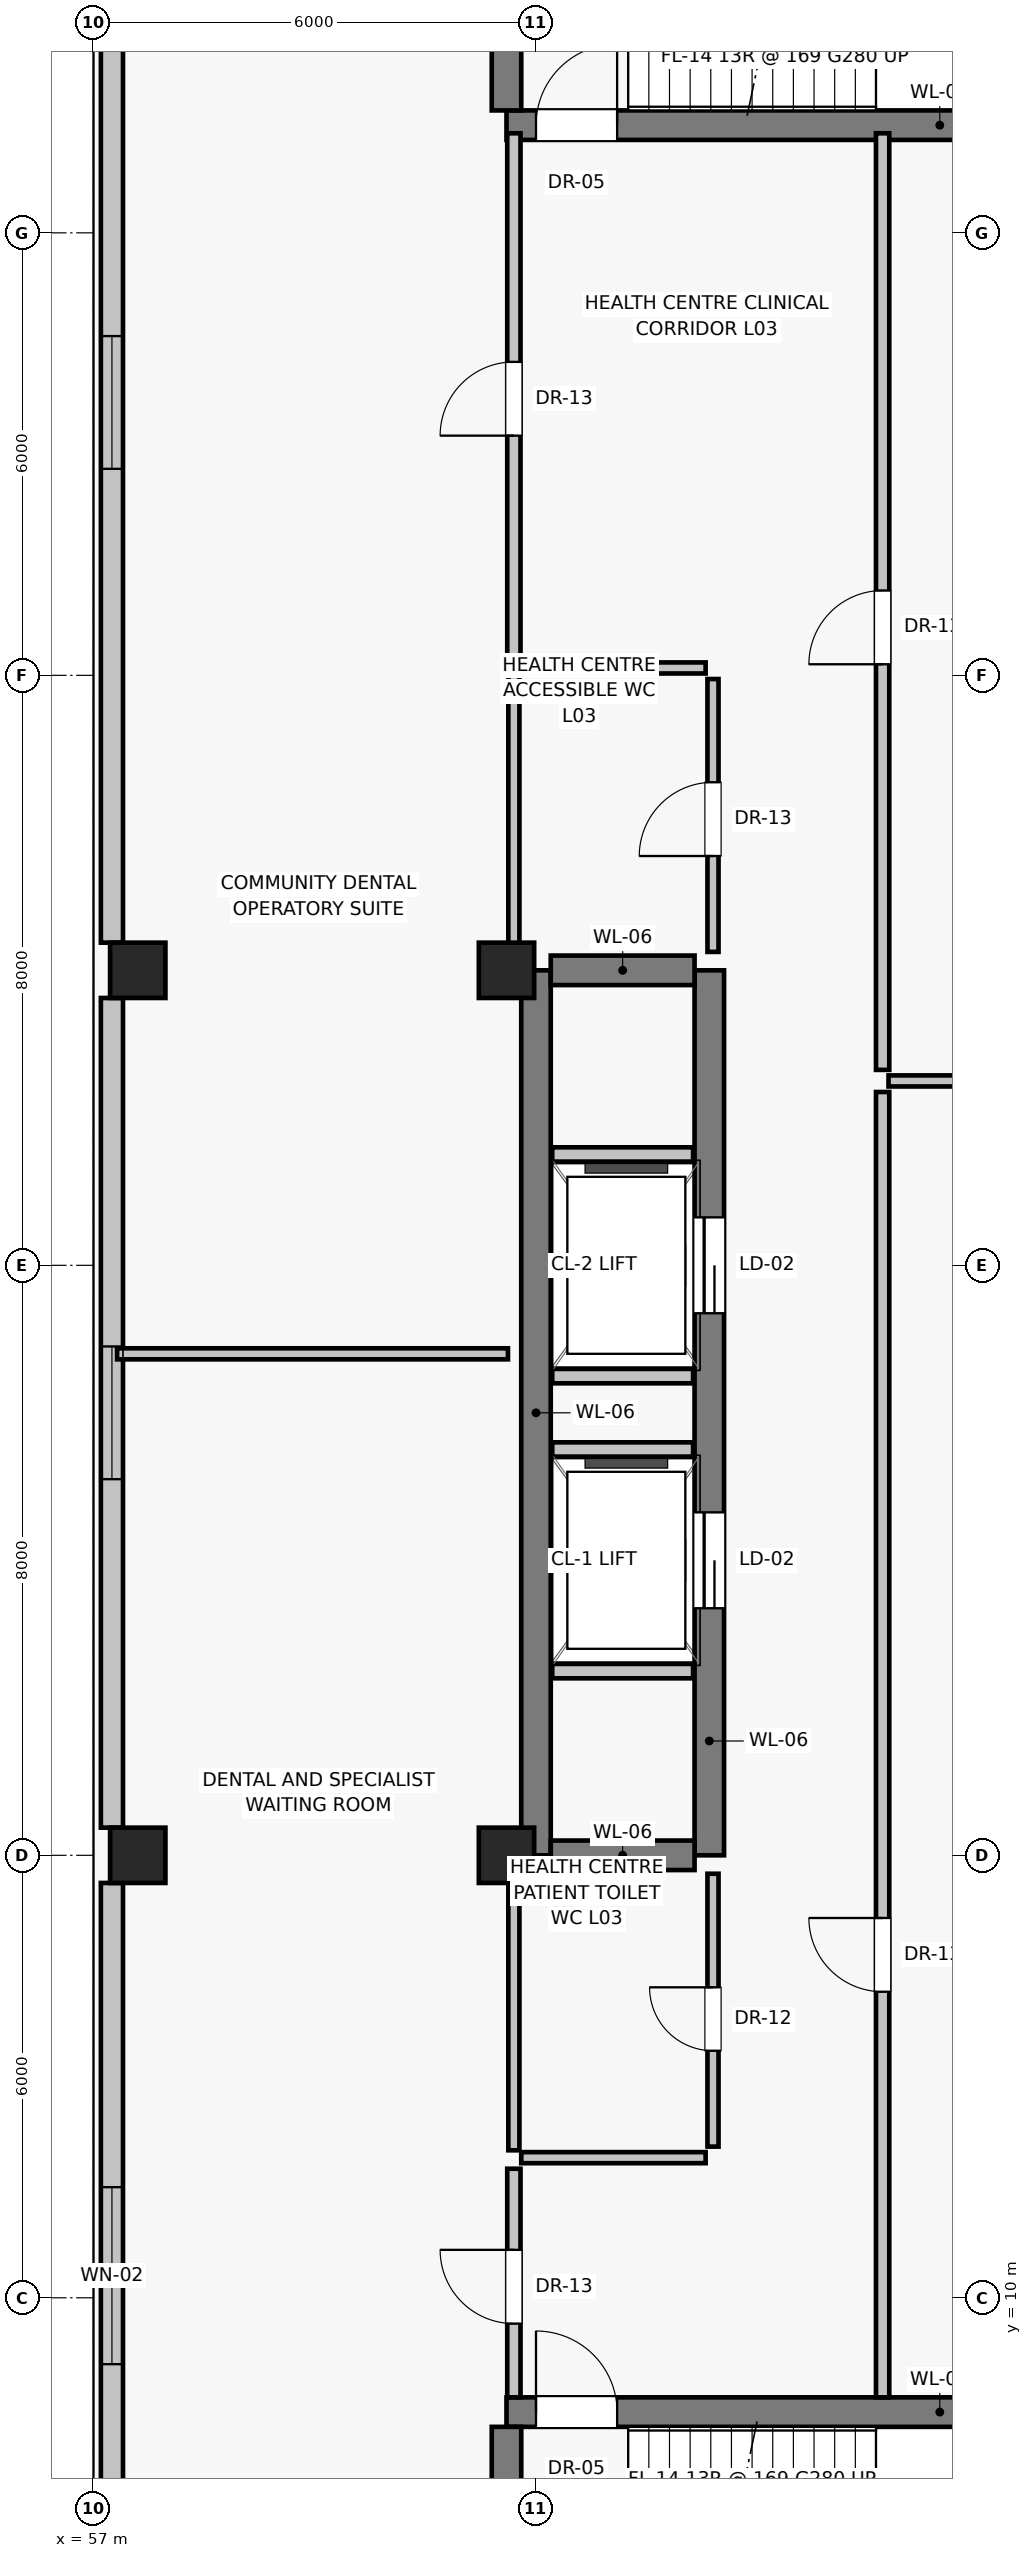
"""IFC4 building model, lengths in metres.
Left out: names, types, materials, properties, quantities, classifications, styles, units other than length and angle.
Written with IfcOpenShell. Run it as: python <this file> out.ifc"""

import sys

from ifc_helpers import new_model, si_unit, direction, frame, frame_2d, origin, origin_2d, place, context, subcontext, project, spatial, rectangle, extrude, source, transform, mapped, element, fill, save


model = new_model("IFC4")
c1 = context("Model", 3, precision=1e-05, world=origin(), true_north=direction((0.0, 1.0)))
c2 = subcontext(c1, "Body", "Model", "MODEL_VIEW")
j1 = project(units=[si_unit("LENGTHUNIT", "METRE"), si_unit("PLANEANGLEUNIT", "RADIAN")], contexts=[c1])
p1 = place(None, origin())
s1 = spatial("IfcSite", under=j1, at=p1, CompositionType="ELEMENT")
p2 = place(p1, origin())
s2 = spatial("IfcBuilding", under=s1, at=p2, CompositionType="ELEMENT")
p3 = place(p2, frame((0.0, 0.0, 14.0)))
s3 = spatial("IfcBuildingStorey", under=s2, at=p3, CompositionType="ELEMENT", Elevation=14.0)
for number, where, z_axis, x_axis in (
    (1, (57.6, 16.0, 0.0), (0.0, 0.0, 1.0), (1.0, 0.0, 0.0)),
    (2, (57.6, 28.0, 0.0), (0.0, 0.0, 1.0), (1.0, 0.0, 0.0)),
    (3, (62.6, 16.0, 0.0), (0.0, 0.0, 1.0), (1.0, 0.0, 0.0)),
    (4, (62.6, 28.0, 0.0), (0.0, 0.0, 1.0), (1.0, 0.0, 0.0)),
):
    element("IfcColumn", number, at=place(p3, frame(where, z_axis=z_axis, x_axis=x_axis)), inside=s3, PredefinedType="COLUMN", context=c2, shape_type="SweptSolid", body=[
        extrude(rectangle(XDim=0.75, YDim=0.75, at=origin_2d()), origin(), (0.0, 0.0, 1.0), 4.4),
    ])
p4 = place(p3, frame((57.25, 43.6, 0.0), z_axis=(0.0, 0.0, 1.0), x_axis=(0.0, -1.0, 0.0)))
e5 = element("IfcWall", 5, at=p4, inside=s3, PredefinedType="SOLIDWALL", context=c2, shape_type="SweptSolid", body=[
    extrude(rectangle(XDim=15.225, YDim=0.3, at=frame_2d((7.613, 0.0))), origin(), (0.0, 0.0, 1.0), 3.35),
])
p5 = place(p4, frame((7.0, 0.0, 0.85)))
e6 = element("IfcOpeningElement", 6, at=p5, cuts=e5, PredefinedType="OPENING", context=c2, shape_type="SweptSolid", body=[
    extrude(rectangle(XDim=1.8, YDim=1.65, at=frame_2d((0.9, 0.825))), frame((0.0, 0.16, 0.0), z_axis=(0.0, -1.0, 0.0), x_axis=(1.0, 0.0, 0.0)), (0.0, 0.0, 1.0), 0.32),
])
p6 = place(p3, frame((57.25, 27.625, 0.0), z_axis=(0.0, 0.0, 1.0), x_axis=(0.0, -1.0, 0.0)))
e7 = element("IfcWall", 7, at=p6, inside=s3, PredefinedType="SOLIDWALL", context=c2, shape_type="SweptSolid", body=[
    extrude(rectangle(XDim=11.25, YDim=0.3, at=frame_2d((5.625, 0.0))), origin(), (0.0, 0.0, 1.0), 3.35),
])
p7 = place(p6, frame((4.725, 0.0, 0.85)))
e8 = element("IfcOpeningElement", 8, at=p7, cuts=e7, PredefinedType="OPENING", context=c2, shape_type="SweptSolid", body=[
    extrude(rectangle(XDim=1.8, YDim=1.65, at=frame_2d((0.9, 0.825))), frame((0.0, 0.16, 0.0), z_axis=(0.0, -1.0, 0.0), x_axis=(1.0, 0.0, 0.0)), (0.0, 0.0, 1.0), 0.32),
])
p8 = place(p3, frame((57.25, 15.625, 0.0), z_axis=(0.0, 0.0, 1.0), x_axis=(0.0, -1.0, 0.0)))
e9 = element("IfcWall", 9, at=p8, inside=s3, PredefinedType="SOLIDWALL", context=c2, shape_type="SweptSolid", body=[
    extrude(rectangle(XDim=11.225, YDim=0.3, at=frame_2d((5.613, 0.0))), origin(), (0.0, 0.0, 1.0), 3.35),
])
p9 = place(p8, frame((4.125, 0.0, 0.85)))
e10 = element("IfcOpeningElement", 10, at=p9, cuts=e9, PredefinedType="OPENING", context=c2, shape_type="SweptSolid", body=[
    extrude(rectangle(XDim=2.4, YDim=1.8, at=frame_2d((1.2, 0.9))), frame((0.0, 0.16, 0.0), z_axis=(0.0, -1.0, 0.0), x_axis=(1.0, 0.0, 0.0)), (0.0, 0.0, 1.0), 0.32),
])
p10 = place(p3, frame((63.0, 16.0, 0.0), z_axis=(0.0, 0.0, 1.0), x_axis=(0.0, 1.0, 0.0)))
e11 = element("IfcWall", 11, at=p10, inside=s3, PredefinedType="SHEAR", context=c2, shape_type="SweptSolid", body=[
    extrude(rectangle(XDim=12.0, YDim=0.4, at=frame_2d((6.0, 0.0))), origin(), (0.0, 0.0, 1.0), 4.1),
])
p11 = place(p3, frame((65.35, 16.0, 0.0), z_axis=(0.0, 0.0, 1.0), x_axis=(0.0, 1.0, 0.0)))
e12 = element("IfcWall", 12, at=p11, inside=s3, PredefinedType="SHEAR", context=c2, shape_type="SweptSolid", body=[
    extrude(rectangle(XDim=12.0, YDim=0.4, at=frame_2d((6.0, 0.0))), origin(), (0.0, 0.0, 1.0), 4.1),
])
p12 = place(p11, frame((3.35, 0.0, 0.0)))
e13 = element("IfcOpeningElement", 13, at=p12, cuts=e12, PredefinedType="OPENING", context=c2, shape_type="SweptSolid", body=[
    extrude(rectangle(XDim=1.3, YDim=2.25, at=frame_2d((0.65, 1.125))), frame((0.0, 0.21, 0.0), z_axis=(0.0, -1.0, 0.0), x_axis=(1.0, 0.0, 0.0)), (0.0, 0.0, 1.0), 0.42),
])
p13 = place(p11, frame((7.35, 0.0, 0.0)))
e14 = element("IfcOpeningElement", 14, at=p13, cuts=e12, PredefinedType="OPENING", context=c2, shape_type="SweptSolid", body=[
    extrude(rectangle(XDim=1.3, YDim=2.25, at=frame_2d((0.65, 1.125))), frame((0.0, 0.21, 0.0), z_axis=(0.0, -1.0, 0.0), x_axis=(1.0, 0.0, 0.0)), (0.0, 0.0, 1.0), 0.42),
])
for number, where, z_axis, x_axis in (
    (15, (63.2, 16.0, 0.0), (0.0, 0.0, 1.0), (1.0, 0.0, 0.0)),
    (16, (63.2, 28.0, 0.0), (0.0, 0.0, 1.0), (1.0, 0.0, 0.0)),
):
    element("IfcWall", number, at=place(p3, frame(where, z_axis=z_axis, x_axis=x_axis)), inside=s3, PredefinedType="SHEAR", context=c2, shape_type="SweptSolid", body=[
        extrude(rectangle(XDim=1.95, YDim=0.4, at=frame_2d((0.975, 0.0))), origin(), (0.0, 0.0, 1.0), 4.1),
    ])
for number, where, z_axis, x_axis in (
    (17, (63.22, 18.5, 0.0), (0.0, 0.0, 1.0), (1.0, 0.0, 0.0)),
    (18, (63.22, 21.5, 0.0), (0.0, 0.0, 1.0), (1.0, 0.0, 0.0)),
    (19, (63.22, 22.5, 0.0), (0.0, 0.0, 1.0), (1.0, 0.0, 0.0)),
    (20, (63.22, 25.5, 0.0), (0.0, 0.0, 1.0), (1.0, 0.0, 0.0)),
):
    element("IfcWall", number, at=place(p3, frame(where, z_axis=z_axis, x_axis=x_axis)), inside=s3, PredefinedType="SOLIDWALL", context=c2, shape_type="SweptSolid", body=[
        extrude(rectangle(XDim=1.91, YDim=0.2, at=frame_2d((0.955, 0.0))), origin(), (0.0, 0.0, 1.0), 4.1),
    ])
p14 = place(p3, frame((62.6, 8.45, 0.0), z_axis=(0.0, 0.0, 1.0), x_axis=(1.0, 0.0, 0.0)))
e21 = element("IfcWall", 21, at=p14, inside=s3, PredefinedType="SHEAR", context=c2, shape_type="SweptSolid", body=[
    extrude(rectangle(XDim=10.0, YDim=0.4, at=frame_2d((5.0, 0.0))), origin(), (0.0, 0.0, 1.0), 4.1),
])
p15 = place(p14, frame((0.4, 0.0, 0.0)))
e22 = element("IfcOpeningElement", 22, at=p15, cuts=e21, PredefinedType="OPENING", context=c2, shape_type="SweptSolid", body=[
    extrude(rectangle(XDim=1.1, YDim=2.03, at=frame_2d((0.55, 1.015))), frame((0.0, 0.21, 0.0), z_axis=(0.0, -1.0, 0.0), x_axis=(1.0, 0.0, 0.0)), (0.0, 0.0, 1.0), 0.42),
])
p16 = place(p3, frame((62.6, 5.2, 0.0), z_axis=(0.0, 0.0, 1.0), x_axis=(0.0, 1.0, 0.0)))
e23 = element("IfcWall", 23, at=p16, inside=s3, PredefinedType="SHEAR", context=c2, shape_type="SweptSolid", body=[
    extrude(rectangle(XDim=3.05, YDim=0.4, at=frame_2d((1.525, 0.0))), origin(), (0.0, 0.0, 1.0), 4.1),
])
p17 = place(p3, frame((62.6, 39.46, 0.0), z_axis=(0.0, 0.0, 1.0), x_axis=(1.0, 0.0, 0.0)))
e24 = element("IfcWall", 24, at=p17, inside=s3, PredefinedType="SHEAR", context=c2, shape_type="SweptSolid", body=[
    extrude(rectangle(XDim=10.0, YDim=0.4, at=frame_2d((5.0, 0.0))), origin(), (0.0, 0.0, 1.0), 4.1),
])
p18 = place(p17, frame((0.4, 0.0, 0.0)))
e25 = element("IfcOpeningElement", 25, at=p18, cuts=e24, PredefinedType="OPENING", context=c2, shape_type="SweptSolid", body=[
    extrude(rectangle(XDim=1.1, YDim=2.03, at=frame_2d((0.55, 1.015))), frame((0.0, 0.21, 0.0), z_axis=(0.0, -1.0, 0.0), x_axis=(1.0, 0.0, 0.0)), (0.0, 0.0, 1.0), 0.42),
])
p19 = place(p3, frame((62.6, 39.66, 0.0), z_axis=(0.0, 0.0, 1.0), x_axis=(0.0, 1.0, 0.0)))
e26 = element("IfcWall", 26, at=p19, inside=s3, PredefinedType="SHEAR", context=c2, shape_type="SweptSolid", body=[
    extrude(rectangle(XDim=3.05, YDim=0.4, at=frame_2d((1.525, 0.0))), origin(), (0.0, 0.0, 1.0), 4.1),
])
p20 = place(p3, frame((62.8, 11.9, 0.0), z_axis=(0.0, 0.0, 1.0), x_axis=(1.0, 0.0, 0.0)))
e27 = element("IfcWall", 27, at=p20, inside=s3, PredefinedType="PARTITIONING", context=c2, shape_type="SweptSolid", body=[
    extrude(rectangle(XDim=2.5, YDim=0.15, at=frame_2d((1.25, 0.0))), origin(), (0.0, 0.0, 1.0), 4.1),
])
p21 = place(p3, frame((62.7, 12.0, 0.0), z_axis=(0.0, 0.0, 1.0), x_axis=(0.0, 1.0, 0.0)))
e28 = element("IfcWall", 28, at=p21, inside=s3, PredefinedType="PARTITIONING", context=c2, shape_type="SweptSolid", body=[
    extrude(rectangle(XDim=3.8, YDim=0.15, at=frame_2d((1.9, 0.0))), origin(), (0.0, 0.0, 1.0), 3.5),
])
p22 = place(p3, frame((65.4, 12.05, 0.0), z_axis=(0.0, 0.0, 1.0), x_axis=(0.0, 1.0, 0.0)))
e29 = element("IfcWall", 29, at=p22, inside=s3, PredefinedType="PARTITIONING", context=c2, shape_type="SweptSolid", body=[
    extrude(rectangle(XDim=3.7, YDim=0.15, at=frame_2d((1.85, 0.0))), origin(), (0.0, 0.0, 1.0), 4.1),
])
p23 = place(p22, frame((1.3, 0.0, 0.0)))
e30 = element("IfcOpeningElement", 30, at=p23, cuts=e29, PredefinedType="OPENING", context=c2, shape_type="SweptSolid", body=[
    extrude(rectangle(XDim=0.86, YDim=2.01, at=frame_2d((0.43, 1.005))), frame((0.0, 0.085, 0.0), z_axis=(0.0, -1.0, 0.0), x_axis=(1.0, 0.0, 0.0)), (0.0, 0.0, 1.0), 0.17),
])
p24 = place(p3, frame((62.8, 32.1, 0.0), z_axis=(0.0, 0.0, 1.0), x_axis=(1.0, 0.0, 0.0)))
e31 = element("IfcWall", 31, at=p24, inside=s3, PredefinedType="PARTITIONING", context=c2, shape_type="SweptSolid", body=[
    extrude(rectangle(XDim=2.5, YDim=0.15, at=frame_2d((1.25, 0.0))), origin(), (0.0, 0.0, 1.0), 4.1),
])
p25 = place(p3, frame((62.7, 28.2, 0.0), z_axis=(0.0, 0.0, 1.0), x_axis=(0.0, 1.0, 0.0)))
e32 = element("IfcWall", 32, at=p25, inside=s3, PredefinedType="PARTITIONING", context=c2, shape_type="SweptSolid", body=[
    extrude(rectangle(XDim=3.8, YDim=0.15, at=frame_2d((1.9, 0.0))), origin(), (0.0, 0.0, 1.0), 3.5),
])
p26 = place(p3, frame((65.4, 28.25, 0.0), z_axis=(0.0, 0.0, 1.0), x_axis=(0.0, 1.0, 0.0)))
e33 = element("IfcWall", 33, at=p26, inside=s3, PredefinedType="PARTITIONING", context=c2, shape_type="SweptSolid", body=[
    extrude(rectangle(XDim=3.7, YDim=0.15, at=frame_2d((1.85, 0.0))), origin(), (0.0, 0.0, 1.0), 4.1),
])
p27 = place(p26, frame((1.3, 0.0, 0.0)))
e34 = element("IfcOpeningElement", 34, at=p27, cuts=e33, PredefinedType="OPENING", context=c2, shape_type="SweptSolid", body=[
    extrude(rectangle(XDim=1.0, YDim=2.01, at=frame_2d((0.5, 1.005))), frame((0.0, 0.085, 0.0), z_axis=(0.0, -1.0, 0.0), x_axis=(1.0, 0.0, 0.0)), (0.0, 0.0, 1.0), 0.17),
])
p28 = place(p3, frame((62.7, 8.65, 0.0), z_axis=(0.0, 0.0, 1.0), x_axis=(0.0, 1.0, 0.0)))
e35 = element("IfcWall", 35, at=p28, inside=s3, PredefinedType="PARTITIONING", context=c2, shape_type="SweptSolid", body=[
    extrude(rectangle(XDim=3.1, YDim=0.18, at=frame_2d((1.55, 0.0))), origin(), (0.0, 0.0, 1.0), 3.5),
])
p29 = place(p28, frame((1.0, 0.0, 0.0)))
e36 = element("IfcOpeningElement", 36, at=p29, cuts=e35, PredefinedType="OPENING", context=c2, shape_type="SweptSolid", body=[
    extrude(rectangle(XDim=1.0, YDim=2.01, at=frame_2d((0.5, 1.005))), frame((0.0, 0.1, 0.0), z_axis=(0.0, -1.0, 0.0), x_axis=(1.0, 0.0, 0.0)), (0.0, 0.0, 1.0), 0.2),
])
p30 = place(p3, frame((62.7, 32.25, 0.0), z_axis=(0.0, 0.0, 1.0), x_axis=(0.0, 1.0, 0.0)))
e37 = element("IfcWall", 37, at=p30, inside=s3, PredefinedType="PARTITIONING", context=c2, shape_type="SweptSolid", body=[
    extrude(rectangle(XDim=7.1, YDim=0.18, at=frame_2d((3.55, 0.0))), origin(), (0.0, 0.0, 1.0), 3.5),
])
p31 = place(p30, frame((3.0, 0.0, 0.0)))
e38 = element("IfcOpeningElement", 38, at=p31, cuts=e37, PredefinedType="OPENING", context=c2, shape_type="SweptSolid", body=[
    extrude(rectangle(XDim=1.0, YDim=2.01, at=frame_2d((0.5, 1.005))), frame((0.0, 0.1, 0.0), z_axis=(0.0, -1.0, 0.0), x_axis=(1.0, 0.0, 0.0)), (0.0, 0.0, 1.0), 0.2),
])
p32 = place(p3, frame((57.32, 22.8, 0.0), z_axis=(0.0, 0.0, 1.0), x_axis=(1.0, 0.0, 0.0)))
e39 = element("IfcWall", 39, at=p32, inside=s3, PredefinedType="PARTITIONING", context=c2, shape_type="SweptSolid", body=[
    extrude(rectangle(XDim=5.3, YDim=0.15, at=frame_2d((2.65, 0.0))), origin(), (0.0, 0.0, 1.0), 4.1),
])
p33 = place(p3, frame((67.7, 8.65, 0.0), z_axis=(0.0, 0.0, 1.0), x_axis=(0.0, 1.0, 0.0)))
e40 = element("IfcWall", 40, at=p33, inside=s3, PredefinedType="PARTITIONING", context=c2, shape_type="SweptSolid", body=[
    extrude(rectangle(XDim=17.7, YDim=0.18, at=frame_2d((8.85, 0.0))), origin(), (0.0, 0.0, 1.0), 4.1),
])
p34 = place(p33, frame((5.5, 0.0, 0.0)))
e41 = element("IfcOpeningElement", 41, at=p34, cuts=e40, PredefinedType="OPENING", context=c2, shape_type="SweptSolid", body=[
    extrude(rectangle(XDim=1.0, YDim=2.01, at=frame_2d((0.5, 1.005))), frame((0.0, 0.1, 0.0), z_axis=(0.0, -1.0, 0.0), x_axis=(1.0, 0.0, 0.0)), (0.0, 0.0, 1.0), 0.2),
])
p35 = place(p3, frame((67.7, 26.65, 0.0), z_axis=(0.0, 0.0, 1.0), x_axis=(0.0, 1.0, 0.0)))
e42 = element("IfcWall", 42, at=p35, inside=s3, PredefinedType="PARTITIONING", context=c2, shape_type="SweptSolid", body=[
    extrude(rectangle(XDim=12.7, YDim=0.18, at=frame_2d((6.35, 0.0))), origin(), (0.0, 0.0, 1.0), 4.1),
])
p36 = place(p35, frame((5.5, 0.0, 0.0)))
e43 = element("IfcOpeningElement", 43, at=p36, cuts=e42, PredefinedType="OPENING", context=c2, shape_type="SweptSolid", body=[
    extrude(rectangle(XDim=1.0, YDim=2.01, at=frame_2d((0.5, 1.005))), frame((0.0, 0.1, 0.0), z_axis=(0.0, -1.0, 0.0), x_axis=(1.0, 0.0, 0.0)), (0.0, 0.0, 1.0), 0.2),
])
p37 = place(p3, frame((67.78, 26.5, 0.0), z_axis=(0.0, 0.0, 1.0), x_axis=(1.0, 0.0, 0.0)))
e44 = element("IfcWall", 44, at=p37, inside=s3, PredefinedType="PARTITIONING", context=c2, shape_type="SweptSolid", body=[
    extrude(rectangle(XDim=6.9, YDim=0.15, at=frame_2d((3.45, 0.0))), origin(), (0.0, 0.0, 1.0), 4.1),
])
m1 = source(origin(), c2, "Body", "SweptSolid", [
    extrude(rectangle(XDim=1.8, YDim=1.65, at=frame_2d((0.9, 0.825))), frame((0.0, 0.03, 0.0), z_axis=(0.0, -1.0, 0.0), x_axis=(1.0, 0.0, 0.0)), (0.0, 0.0, 1.0), 0.06),
])
p38 = place(p5, origin())
e45 = element("IfcWindow", 45, at=p38, inside=s3, PartitioningType="DOUBLE_PANEL_VERTICAL", PredefinedType="WINDOW", context=c2, shape_type="MappedRepresentation", body=[
    mapped(m1, transform((0.0, 0.0, 0.0), scale=1.0)),
])
fill(e6, e45)
p39 = place(p7, origin())
e46 = element("IfcWindow", 46, at=p39, inside=s3, PartitioningType="DOUBLE_PANEL_VERTICAL", PredefinedType="WINDOW", context=c2, shape_type="MappedRepresentation", body=[
    mapped(m1, transform((0.0, 0.0, 0.0), scale=1.0)),
])
fill(e8, e46)
m2 = source(origin(), c2, "Body", "SweptSolid", [
    extrude(rectangle(XDim=2.4, YDim=1.8, at=frame_2d((1.2, 0.9))), frame((0.0, 0.03, 0.0), z_axis=(0.0, -1.0, 0.0), x_axis=(1.0, 0.0, 0.0)), (0.0, 0.0, 1.0), 0.06),
])
p40 = place(p9, origin())
e47 = element("IfcWindow", 47, at=p40, inside=s3, PartitioningType="SINGLE_PANEL", PredefinedType="WINDOW", context=c2, shape_type="MappedRepresentation", body=[
    mapped(m2, transform((0.0, 0.0, 0.0), scale=1.0)),
])
fill(e10, e47)
m3 = source(origin(), c2, "Body", "SweptSolid", [
    extrude(rectangle(XDim=1.3, YDim=2.25, at=frame_2d((0.65, 1.125))), frame((0.0, 0.025, 0.0), z_axis=(0.0, -1.0, 0.0), x_axis=(1.0, 0.0, 0.0)), (0.0, 0.0, 1.0), 0.05),
])
p41 = place(p12, origin())
e48 = element("IfcDoor", 48, at=p41, inside=s3, OperationType="SLIDING_TO_LEFT", PredefinedType="DOOR", context=c2, shape_type="MappedRepresentation", body=[
    mapped(m3, transform((0.0, 0.0, 0.0), scale=1.0)),
])
fill(e13, e48)
p42 = place(p13, origin())
e49 = element("IfcDoor", 49, at=p42, inside=s3, OperationType="SLIDING_TO_LEFT", PredefinedType="DOOR", context=c2, shape_type="MappedRepresentation", body=[
    mapped(m3, transform((0.0, 0.0, 0.0), scale=1.0)),
])
fill(e14, e49)
m4 = source(origin(), c2, "Body", "SweptSolid", [
    extrude(rectangle(XDim=1.1, YDim=2.03, at=frame_2d((0.55, 1.015))), frame((0.0, 0.025, 0.0), z_axis=(0.0, -1.0, 0.0), x_axis=(1.0, 0.0, 0.0)), (0.0, 0.0, 1.0), 0.05),
])
p43 = place(p15, origin())
e50 = element("IfcDoor", 50, at=p43, inside=s3, OperationType="SINGLE_SWING_LEFT", PredefinedType="DOOR", context=c2, shape_type="MappedRepresentation", body=[
    mapped(m4, transform((0.0, 0.0, 0.0), scale=1.0)),
])
fill(e22, e50)
p44 = place(p18, origin())
e51 = element("IfcDoor", 51, at=p44, inside=s3, OperationType="SINGLE_SWING_RIGHT", PredefinedType="DOOR", context=c2, shape_type="MappedRepresentation", body=[
    mapped(m4, transform((0.0, 0.0, 0.0), scale=1.0)),
])
fill(e25, e51)
m5 = source(origin(), c2, "Body", "SweptSolid", [
    extrude(rectangle(XDim=0.86, YDim=2.01, at=frame_2d((0.43, 1.005))), frame((0.0, 0.025, 0.0), z_axis=(0.0, -1.0, 0.0), x_axis=(1.0, 0.0, 0.0)), (0.0, 0.0, 1.0), 0.05),
])
p45 = place(p23, origin())
e52 = element("IfcDoor", 52, at=p45, inside=s3, OperationType="SINGLE_SWING_RIGHT", PredefinedType="DOOR", context=c2, shape_type="MappedRepresentation", body=[
    mapped(m5, transform((0.0, 0.0, 0.0), scale=1.0)),
])
fill(e30, e52)
m6 = source(origin(), c2, "Body", "SweptSolid", [
    extrude(rectangle(XDim=1.0, YDim=2.01, at=frame_2d((0.5, 1.005))), frame((0.0, 0.025, 0.0), z_axis=(0.0, -1.0, 0.0), x_axis=(1.0, 0.0, 0.0)), (0.0, 0.0, 1.0), 0.05),
])
p46 = place(p27, origin())
e53 = element("IfcDoor", 53, at=p46, inside=s3, OperationType="SINGLE_SWING_LEFT", PredefinedType="DOOR", context=c2, shape_type="MappedRepresentation", body=[
    mapped(m6, transform((0.0, 0.0, 0.0), scale=1.0)),
])
fill(e34, e53)
p47 = place(p29, origin())
e54 = element("IfcDoor", 54, at=p47, inside=s3, OperationType="SINGLE_SWING_RIGHT", PredefinedType="DOOR", context=c2, shape_type="MappedRepresentation", body=[
    mapped(m6, transform((0.0, 0.0, 0.0), scale=1.0)),
])
fill(e36, e54)
p48 = place(p31, origin())
e55 = element("IfcDoor", 55, at=p48, inside=s3, OperationType="SINGLE_SWING_LEFT", PredefinedType="DOOR", context=c2, shape_type="MappedRepresentation", body=[
    mapped(m6, transform((0.0, 0.0, 0.0), scale=1.0)),
])
fill(e38, e55)
p49 = place(p34, origin())
e56 = element("IfcDoor", 56, at=p49, inside=s3, OperationType="SINGLE_SWING_RIGHT", PredefinedType="DOOR", context=c2, shape_type="MappedRepresentation", body=[
    mapped(m6, transform((0.0, 0.0, 0.0), scale=1.0)),
])
fill(e41, e56)
p50 = place(p36, origin())
e57 = element("IfcDoor", 57, at=p50, inside=s3, OperationType="SINGLE_SWING_LEFT", PredefinedType="DOOR", context=c2, shape_type="MappedRepresentation", body=[
    mapped(m6, transform((0.0, 0.0, 0.0), scale=1.0)),
])
fill(e43, e57)
save(model, sys.argv[1])
